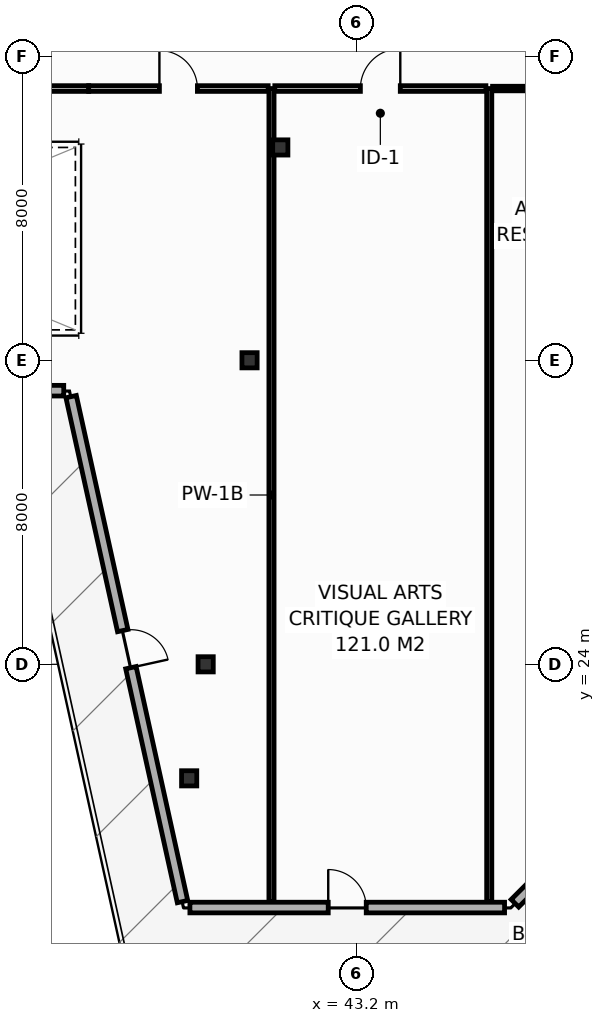
"""IFC4 building model, lengths in metres.
Left out: names, types, materials, properties, quantities, classifications, styles, units other than length and angle.
Written with IfcOpenShell. Run it as: python <this file> out.ifc"""

import sys

from ifc_helpers import new_model, si_unit, direction, frame, frame_2d, origin, origin_2d, place, context, subcontext, project, spatial, rectangle, hollow_rectangle, extrude, element, fill, save


model = new_model("IFC4")
c1 = context("Model", 3, precision=1e-05, world=origin(), true_north=direction((0.0, 1.0)))
c2 = subcontext(c1, "Body", "Model", "MODEL_VIEW")
j1 = project(units=[si_unit("LENGTHUNIT", "METRE"), si_unit("PLANEANGLEUNIT", "RADIAN")], contexts=[c1])
p1 = place(None, origin())
s1 = spatial("IfcSite", under=j1, at=p1, CompositionType="ELEMENT")
p2 = place(p1, origin())
s2 = spatial("IfcBuilding", under=s1, at=p2, CompositionType="ELEMENT")
p3 = place(p2, frame((0.0, 0.0, 230.6)))
s3 = spatial("IfcBuildingStorey", under=s2, at=p3, CompositionType="ELEMENT", Elevation=230.6)
for number, where, z_axis, x_axis in (
    (1, (38.794, 21.0, 0.0), (0.0, 0.0, 1.0), (1.0, 0.0, 0.0)),
    (2, (39.228, 24.0, 0.0), (0.0, 0.0, 1.0), (1.0, 0.0, 0.0)),
    (3, (40.383, 32.0, 0.0), (0.0, 0.0, 1.0), (1.0, 0.0, 0.0)),
    (4, (41.192, 37.6, 0.0), (0.0, 0.0, 1.0), (1.0, 0.0, 0.0)),
):
    element("IfcColumn", number, at=place(p3, frame(where, z_axis=z_axis, x_axis=x_axis)), inside=s3, PredefinedType="COLUMN", context=c2, shape_type="SweptSolid", body=[
        extrude(hollow_rectangle(XDim=0.4, YDim=0.4, WallThickness=0.016, at=origin_2d()), origin(), (0.0, 0.0, 1.0), 3.8),
    ])
p4 = place(p3, frame((24.507, 31.2, 0.0), z_axis=(0.0, 0.0, 1.0), x_axis=(1.0, 0.0, 0.0)))
e5 = element("IfcWall", 5, at=p4, inside=s3, PredefinedType="STANDARD", context=c2, shape_type="SweptSolid", body=[
    extrude(rectangle(XDim=10.987, YDim=0.28, at=frame_2d((5.493, 0.0))), origin(), (0.0, 0.0, 1.0), 3.55),
])
p5 = place(p4, frame((4.993, 0.0, 0.0)))
e6 = element("IfcOpeningElement", 6, at=p5, cuts=e5, PredefinedType="OPENING", context=c2, shape_type="SweptSolid", body=[
    extrude(rectangle(XDim=1.0, YDim=2.2, at=frame_2d((0.5, 1.1))), frame((0.0, 0.15, 0.0), z_axis=(0.0, -1.0, 0.0), x_axis=(1.0, 0.0, 0.0)), (0.0, 0.0, 1.0), 0.3),
])
p6 = place(p3, frame((35.688, 31.044, 0.0), z_axis=(0.0, 0.0, 1.0), x_axis=(0.215414184939, -0.976522774403, 0.0)))
e7 = element("IfcWall", 7, at=p6, inside=s3, PredefinedType="STANDARD", context=c2, shape_type="SweptSolid", body=[
    extrude(rectangle(XDim=13.607, YDim=0.28, at=frame_2d((6.803, 0.0))), origin(), (0.0, 0.0, 1.0), 3.55),
])
p7 = place(p6, frame((6.304, 0.0, 0.0)))
e8 = element("IfcOpeningElement", 8, at=p7, cuts=e7, PredefinedType="OPENING", context=c2, shape_type="SweptSolid", body=[
    extrude(rectangle(XDim=1.0, YDim=2.2, at=frame_2d((0.5, 1.1))), frame((0.0, 0.15, 0.0), z_axis=(0.0, -1.0, 0.0), x_axis=(1.0, 0.0, 0.0)), (0.0, 0.0, 1.0), 0.3),
])
p8 = place(p3, frame((38.813, 17.6, 0.0), z_axis=(0.0, 0.0, 1.0), x_axis=(1.0, 0.0, 0.0)))
e9 = element("IfcWall", 9, at=p8, inside=s3, PredefinedType="STANDARD", context=c2, shape_type="SweptSolid", body=[
    extrude(rectangle(XDim=8.28, YDim=0.28, at=frame_2d((4.14, 0.0))), origin(), (0.0, 0.0, 1.0), 3.55),
])
p9 = place(p8, frame((3.64, 0.0, 0.0)))
e10 = element("IfcOpeningElement", 10, at=p9, cuts=e9, PredefinedType="OPENING", context=c2, shape_type="SweptSolid", body=[
    extrude(rectangle(XDim=1.0, YDim=2.2, at=frame_2d((0.5, 1.1))), frame((0.0, 0.15, 0.0), z_axis=(0.0, -1.0, 0.0), x_axis=(1.0, 0.0, 0.0)), (0.0, 0.0, 1.0), 0.3),
])
p10 = place(p3, frame((47.366, 17.713, 0.0), z_axis=(0.0, 0.0, 1.0), x_axis=(0.70707775441, 0.707135806771, 0.0)))
e11 = element("IfcWall", 11, at=p10, inside=s3, PredefinedType="STANDARD", context=c2, shape_type="SweptSolid", body=[
    extrude(rectangle(XDim=4.206, YDim=0.28, at=frame_2d((2.103, 0.0))), origin(), (0.0, 0.0, 1.0), 3.55),
])
p11 = place(p10, frame((1.603, 0.0, 0.0)))
e12 = element("IfcOpeningElement", 12, at=p11, cuts=e11, PredefinedType="OPENING", context=c2, shape_type="SweptSolid", body=[
    extrude(rectangle(XDim=1.0, YDim=2.2, at=frame_2d((0.5, 1.1))), frame((0.0, 0.15, 0.0), z_axis=(0.0, -1.0, 0.0), x_axis=(1.0, 0.0, 0.0)), (0.0, 0.0, 1.0), 0.3),
])
for number, where, z_axis, x_axis in (
    (13, (40.96, 17.76, 0.0), (0.0, 0.0, 1.0), (0.0, 1.0, 0.0)),
    (14, (46.69, 17.76, 0.0), (0.0, 0.0, 1.0), (0.0, 1.0, 0.0)),
):
    element("IfcWall", number, at=place(p3, frame(where, z_axis=z_axis, x_axis=x_axis)), inside=s3, PredefinedType="PARTITIONING", context=c2, shape_type="SweptSolid", body=[
        extrude(rectangle(XDim=21.39, YDim=0.135, at=frame_2d((10.695, 0.0))), origin(), (0.0, 0.0, 1.0), 2.947),
    ])
p12 = place(p3, frame((23.85, 39.15, 0.0), z_axis=(0.0, 0.0, 1.0), x_axis=(1.0, 0.0, 0.0)))
e15 = element("IfcWall", 15, at=p12, inside=s3, PredefinedType="PARTITIONING", context=c2, shape_type="SweptSolid", body=[
    extrude(rectangle(XDim=12.3, YDim=0.15, at=frame_2d((6.15, 0.0))), origin(), (0.0, 0.0, 1.0), 3.55),
])
p13 = place(p3, frame((36.15, 39.15, 0.0), z_axis=(0.0, 0.0, 1.0), x_axis=(1.0, 0.0, 0.0)))
e16 = element("IfcWall", 16, at=p13, inside=s3, PredefinedType="PARTITIONING", context=c2, shape_type="SweptSolid", body=[
    extrude(rectangle(XDim=4.723, YDim=0.15, at=frame_2d((2.361, 0.0))), origin(), (0.0, 0.0, 1.0), 2.947),
])
p14 = place(p13, frame((1.861, 0.0, 0.0)))
e17 = element("IfcOpeningElement", 17, at=p14, cuts=e16, PredefinedType="OPENING", context=c2, shape_type="SweptSolid", body=[
    extrude(rectangle(XDim=1.0, YDim=2.15, at=frame_2d((0.5, 1.075))), frame((0.0, 0.085, 0.0), z_axis=(0.0, -1.0, 0.0), x_axis=(1.0, 0.0, 0.0)), (0.0, 0.0, 1.0), 0.17),
])
p15 = place(p3, frame((41.048, 39.15, 0.0), z_axis=(0.0, 0.0, 1.0), x_axis=(1.0, 0.0, 0.0)))
e18 = element("IfcWall", 18, at=p15, inside=s3, PredefinedType="PARTITIONING", context=c2, shape_type="SweptSolid", body=[
    extrude(rectangle(XDim=5.555, YDim=0.15, at=frame_2d((2.777, 0.0))), origin(), (0.0, 0.0, 1.0), 3.55),
])
p16 = place(p15, frame((2.252, 0.0, 0.0)))
e19 = element("IfcOpeningElement", 19, at=p16, cuts=e18, PredefinedType="OPENING", context=c2, shape_type="SweptSolid", body=[
    extrude(rectangle(XDim=1.05, YDim=2.15, at=frame_2d((0.525, 1.075))), frame((0.0, 0.085, 0.0), z_axis=(0.0, -1.0, 0.0), x_axis=(1.0, 0.0, 0.0)), (0.0, 0.0, 1.0), 0.17),
])
p17 = place(p3, frame((46.778, 39.15, 0.0), z_axis=(0.0, 0.0, 1.0), x_axis=(1.0, 0.0, 0.0)))
e20 = element("IfcWall", 20, at=p17, inside=s3, PredefinedType="PARTITIONING", context=c2, shape_type="SweptSolid", body=[
    extrude(rectangle(XDim=6.851, YDim=0.12, at=frame_2d((3.426, 0.0))), origin(), (0.0, 0.0, 1.0), 3.085),
])
p18 = place(p17, frame((2.976, 0.0, 0.0)))
e21 = element("IfcOpeningElement", 21, at=p18, cuts=e20, PredefinedType="OPENING", context=c2, shape_type="SweptSolid", body=[
    extrude(rectangle(XDim=0.9, YDim=2.1, at=frame_2d((0.45, 1.05))), frame((0.0, 0.07, 0.0), z_axis=(0.0, -1.0, 0.0), x_axis=(1.0, 0.0, 0.0)), (0.0, 0.0, 1.0), 0.14),
])
p19 = place(p7, origin())
e22 = element("IfcDoor", 22, at=p19, inside=s3, OperationType="SINGLE_SWING_RIGHT", PredefinedType="DOOR", context=c2, shape_type="SweptSolid", body=[
    extrude(rectangle(XDim=1.0, YDim=2.2, at=frame_2d((0.5, 1.1))), frame((0.0, 0.025, 0.0), z_axis=(0.0, -1.0, 0.0), x_axis=(1.0, 0.0, 0.0)), (0.0, 0.0, 1.0), 0.05),
])
fill(e8, e22)
p20 = place(p9, origin())
e23 = element("IfcDoor", 23, at=p20, inside=s3, OperationType="SINGLE_SWING_LEFT", PredefinedType="DOOR", context=c2, shape_type="SweptSolid", body=[
    extrude(rectangle(XDim=1.0, YDim=2.2, at=frame_2d((0.5, 1.1))), frame((0.0, 0.025, 0.0), z_axis=(0.0, -1.0, 0.0), x_axis=(1.0, 0.0, 0.0)), (0.0, 0.0, 1.0), 0.05),
])
fill(e10, e23)
p21 = place(p14, origin())
e24 = element("IfcDoor", 24, at=p21, inside=s3, OperationType="SINGLE_SWING_LEFT", PredefinedType="DOOR", context=c2, shape_type="SweptSolid", body=[
    extrude(rectangle(XDim=1.0, YDim=2.15, at=frame_2d((0.5, 1.075))), frame((0.0, 0.025, 0.0), z_axis=(0.0, -1.0, 0.0), x_axis=(1.0, 0.0, 0.0)), (0.0, 0.0, 1.0), 0.05),
])
fill(e17, e24)
p22 = place(p16, origin())
e25 = element("IfcDoor", 25, at=p22, inside=s3, OperationType="SINGLE_SWING_RIGHT", PredefinedType="DOOR", context=c2, shape_type="SweptSolid", body=[
    extrude(rectangle(XDim=1.05, YDim=2.15, at=frame_2d((0.525, 1.075))), frame((0.0, 0.025, 0.0), z_axis=(0.0, -1.0, 0.0), x_axis=(1.0, 0.0, 0.0)), (0.0, 0.0, 1.0), 0.05),
])
fill(e19, e25)
save(model, sys.argv[1])
